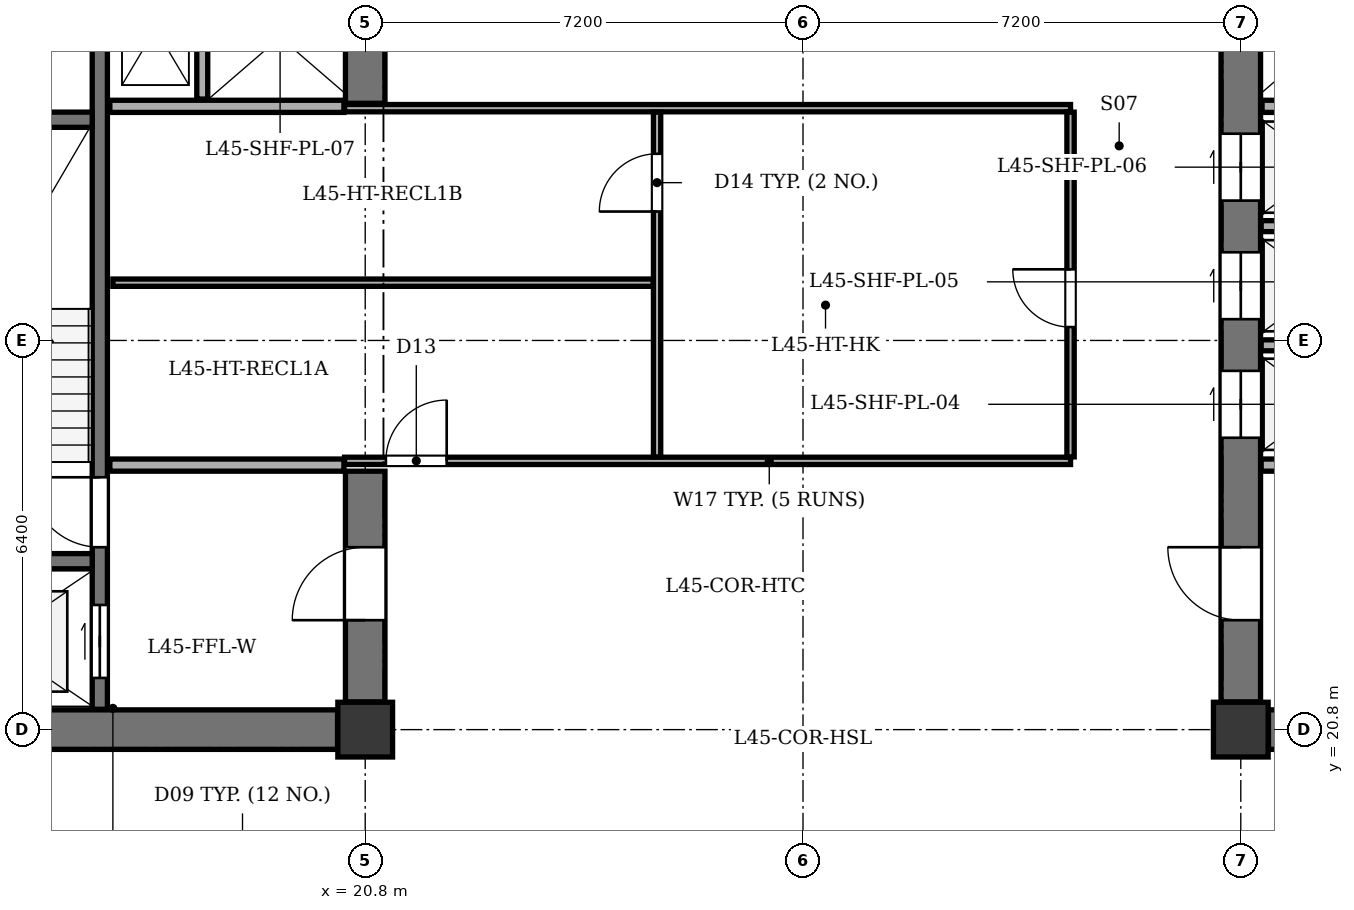
"""IFC4 building model, lengths in metres.
Left out: names, types, materials, properties, quantities, classifications, styles, units other than length and angle.
Written with IfcOpenShell. Run it as: python <this file> out.ifc"""

import sys

from ifc_helpers import new_model, si_unit, direction, frame, frame_2d, origin, origin_2d, place, context, subcontext, project, spatial, rectangle, extrude, element, fill, save


model = new_model("IFC4")
c1 = context("Model", 3, precision=1e-05, world=origin(), true_north=direction((0.0, 1.0)))
c2 = subcontext(c1, "Body", "Model", "MODEL_VIEW")
j1 = project(units=[si_unit("LENGTHUNIT", "METRE"), si_unit("PLANEANGLEUNIT", "RADIAN")], contexts=[c1])
p1 = place(None, origin())
s1 = spatial("IfcSite", under=j1, at=p1, CompositionType="ELEMENT")
p2 = place(p1, origin())
s2 = spatial("IfcBuilding", under=s1, at=p2, CompositionType="ELEMENT")
p3 = place(p2, frame((0.0, 0.0, 176.3)))
s3 = spatial("IfcBuildingStorey", under=s2, at=p3, CompositionType="ELEMENT", Elevation=176.3)
for number, where, z_axis, x_axis in (
    (1, (20.8, 20.8, 0.0), (0.0, 0.0, 1.0), (1.0, 0.0, 0.0)),
    (2, (35.2, 20.8, 0.0), (0.0, 0.0, 1.0), (1.0, 0.0, 0.0)),
):
    element("IfcColumn", number, at=place(p3, frame(where, z_axis=z_axis, x_axis=x_axis)), inside=s3, PredefinedType="COLUMN", context=c2, shape_type="SweptSolid", body=[
        extrude(rectangle(XDim=0.9, YDim=0.9, at=origin_2d()), origin(), (0.0, 0.0, 1.0), 3.5),
    ])
p4 = place(p3, frame((13.255, 20.8, 0.0), z_axis=(0.0, 0.0, 1.0), x_axis=(1.0, 0.0, 0.0)))
e3 = element("IfcWall", 3, at=p4, inside=s3, PredefinedType="SHEAR", context=c2, shape_type="SweptSolid", body=[
    extrude(rectangle(XDim=7.09, YDim=0.65, at=frame_2d((3.545, 0.0))), origin(), (0.0, 0.0, 1.0), 3.2),
])
p5 = place(p3, frame((20.8, 21.255, 0.0), z_axis=(0.0, 0.0, 1.0), x_axis=(0.0, 1.0, 0.0)))
e4 = element("IfcWall", 4, at=p5, inside=s3, PredefinedType="SHEAR", context=c2, shape_type="SweptSolid", body=[
    extrude(rectangle(XDim=3.795, YDim=0.65, at=frame_2d((1.897, 0.0))), origin(), (0.0, 0.0, 1.0), 3.2),
])
p6 = place(p5, frame((1.345, 0.0, 0.0)))
e5 = element("IfcOpeningElement", 5, at=p6, cuts=e4, PredefinedType="OPENING", context=c2, shape_type="SweptSolid", body=[
    extrude(rectangle(XDim=1.2, YDim=2.15, at=frame_2d((0.6, 1.075))), frame((0.0, 0.335, 0.0), z_axis=(0.0, -1.0, 0.0), x_axis=(1.0, 0.0, 0.0)), (0.0, 0.0, 1.0), 0.67),
])
p7 = place(p3, frame((20.8, 31.1, 0.0), z_axis=(0.0, 0.0, 1.0), x_axis=(0.0, 1.0, 0.0)))
e6 = element("IfcWall", 6, at=p7, inside=s3, PredefinedType="SHEAR", context=c2, shape_type="SweptSolid", body=[
    extrude(rectangle(XDim=2.045, YDim=0.65, at=frame_2d((1.022, 0.0))), origin(), (0.0, 0.0, 1.0), 3.2),
])
p8 = place(p3, frame((16.435, 21.135, 0.0), z_axis=(0.0, 0.0, 1.0), x_axis=(0.0, 1.0, 0.0)))
e7 = element("IfcWall", 7, at=p8, inside=s3, PredefinedType="SHEAR", context=c2, shape_type="SweptSolid", body=[
    extrude(rectangle(XDim=12.13, YDim=0.25, at=frame_2d((6.065, 0.0))), origin(), (0.0, 0.0, 1.0), 3.2),
])
p9 = place(p8, frame((0.515, 0.0, 0.0)))
e8 = element("IfcOpeningElement", 8, at=p9, cuts=e7, PredefinedType="OPENING", context=c2, shape_type="SweptSolid", body=[
    extrude(rectangle(XDim=1.2, YDim=2.15, at=frame_2d((0.6, 1.075))), frame((0.0, 0.135, 0.0), z_axis=(0.0, -1.0, 0.0), x_axis=(1.0, 0.0, 0.0)), (0.0, 0.0, 1.0), 0.27),
])
p10 = place(p8, frame((2.665, 0.0, 0.0)))
e9 = element("IfcOpeningElement", 9, at=p10, cuts=e7, PredefinedType="OPENING", context=c2, shape_type="SweptSolid", body=[
    extrude(rectangle(XDim=1.15, YDim=2.15, at=frame_2d((0.575, 1.075))), frame((0.0, 0.135, 0.0), z_axis=(0.0, -1.0, 0.0), x_axis=(1.0, 0.0, 0.0)), (0.0, 0.0, 1.0), 0.27),
])
for number, where, z_axis, x_axis in (
    (10, (13.135, 23.57, 0.0), (0.0, 0.0, 1.0), (1.0, 0.0, 0.0)),
    (11, (13.135, 30.83, 0.0), (0.0, 0.0, 1.0), (1.0, 0.0, 0.0)),
):
    element("IfcWall", number, at=place(p3, frame(where, z_axis=z_axis, x_axis=x_axis)), inside=s3, PredefinedType="SHEAR", context=c2, shape_type="SweptSolid", body=[
        extrude(rectangle(XDim=3.175, YDim=0.25, at=frame_2d((1.587, 0.0))), origin(), (0.0, 0.0, 1.0), 3.2),
    ])
for number, where, z_axis, x_axis in (
    (12, (16.6, 25.15, 0.0), (0.0, 0.0, 1.0), (1.0, 0.0, 0.0)),
    (13, (16.6, 31.05, 0.0), (0.0, 0.0, 1.0), (1.0, 0.0, 0.0)),
):
    element("IfcWall", number, at=place(p3, frame(where, z_axis=z_axis, x_axis=x_axis)), inside=s3, PredefinedType="SOLIDWALL", context=c2, shape_type="SweptSolid", body=[
        extrude(rectangle(XDim=3.85, YDim=0.2, at=frame_2d((1.925, 0.0))), origin(), (0.0, 0.0, 1.0), 3.2),
    ])
p11 = place(p3, frame((18.12, 31.17, 0.0), z_axis=(0.0, 0.0, 1.0), x_axis=(0.0, 1.0, 0.0)))
e14 = element("IfcWall", 14, at=p11, inside=s3, PredefinedType="PARTITIONING", context=c2, shape_type="SweptSolid", body=[
    extrude(rectangle(XDim=2.095, YDim=0.18, at=frame_2d((1.047, 0.0))), origin(), (0.0, 0.0, 1.0), 3.2),
])
p12 = place(p3, frame((35.655, 20.8, 0.0), z_axis=(0.0, 0.0, 1.0), x_axis=(1.0, 0.0, 0.0)))
e15 = element("IfcWall", 15, at=p12, inside=s3, PredefinedType="SHEAR", context=c2, shape_type="SweptSolid", body=[
    extrude(rectangle(XDim=7.09, YDim=0.65, at=frame_2d((3.545, 0.0))), origin(), (0.0, 0.0, 1.0), 3.2),
])
p13 = place(p3, frame((35.2, 21.255, 0.0), z_axis=(0.0, 0.0, 1.0), x_axis=(0.0, 1.0, 0.0)))
e16 = element("IfcWall", 16, at=p13, inside=s3, PredefinedType="SHEAR", context=c2, shape_type="SweptSolid", body=[
    extrude(rectangle(XDim=11.89, YDim=0.65, at=frame_2d((5.945, 0.0))), origin(), (0.0, 0.0, 1.0), 3.2),
])
p14 = place(p13, frame((1.345, 0.0, 0.0)))
e17 = element("IfcOpeningElement", 17, at=p14, cuts=e16, PredefinedType="OPENING", context=c2, shape_type="SweptSolid", body=[
    extrude(rectangle(XDim=1.2, YDim=2.15, at=frame_2d((0.6, 1.075))), frame((0.0, 0.335, 0.0), z_axis=(0.0, -1.0, 0.0), x_axis=(1.0, 0.0, 0.0)), (0.0, 0.0, 1.0), 0.67),
])
p15 = place(p13, frame((4.345, 0.0, 0.0)))
e18 = element("IfcOpeningElement", 18, at=p15, cuts=e16, PredefinedType="OPENING", context=c2, shape_type="SweptSolid", body=[
    extrude(rectangle(XDim=1.1, YDim=2.1, at=frame_2d((0.55, 1.05))), frame((0.0, 0.335, 0.0), z_axis=(0.0, -1.0, 0.0), x_axis=(1.0, 0.0, 0.0)), (0.0, 0.0, 1.0), 0.67),
])
p16 = place(p13, frame((6.295, 0.0, 0.0)))
e19 = element("IfcOpeningElement", 19, at=p16, cuts=e16, PredefinedType="OPENING", context=c2, shape_type="SweptSolid", body=[
    extrude(rectangle(XDim=1.1, YDim=2.1, at=frame_2d((0.55, 1.05))), frame((0.0, 0.335, 0.0), z_axis=(0.0, -1.0, 0.0), x_axis=(1.0, 0.0, 0.0)), (0.0, 0.0, 1.0), 0.67),
])
p17 = place(p13, frame((8.245, 0.0, 0.0)))
e20 = element("IfcOpeningElement", 20, at=p17, cuts=e16, PredefinedType="OPENING", context=c2, shape_type="SweptSolid", body=[
    extrude(rectangle(XDim=1.1, YDim=2.1, at=frame_2d((0.55, 1.05))), frame((0.0, 0.335, 0.0), z_axis=(0.0, -1.0, 0.0), x_axis=(1.0, 0.0, 0.0)), (0.0, 0.0, 1.0), 0.67),
])
p18 = place(p3, frame((35.535, 25.15, 0.0), z_axis=(0.0, 0.0, 1.0), x_axis=(1.0, 0.0, 0.0)))
e21 = element("IfcWall", 21, at=p18, inside=s3, PredefinedType="SOLIDWALL", context=c2, shape_type="SweptSolid", body=[
    extrude(rectangle(XDim=3.865, YDim=0.2, at=frame_2d((1.933, 0.0))), origin(), (0.0, 0.0, 1.0), 3.2),
])
p19 = place(p3, frame((35.55, 31.05, 0.0), z_axis=(0.0, 0.0, 1.0), x_axis=(1.0, 0.0, 0.0)))
e22 = element("IfcWall", 22, at=p19, inside=s3, PredefinedType="SOLIDWALL", context=c2, shape_type="SweptSolid", body=[
    extrude(rectangle(XDim=2.25, YDim=0.2, at=frame_2d((1.125, 0.0))), origin(), (0.0, 0.0, 1.0), 3.2),
])
for number, where, z_axis, x_axis in (
    (23, (35.535, 27.12, 0.0), (0.0, 0.0, 1.0), (1.0, 0.0, 0.0)),
    (24, (35.535, 29.08, 0.0), (0.0, 0.0, 1.0), (1.0, 0.0, 0.0)),
):
    element("IfcWall", number, at=place(p3, frame(where, z_axis=z_axis, x_axis=x_axis)), inside=s3, PredefinedType="PARTITIONING", context=c2, shape_type="SweptSolid", body=[
        extrude(rectangle(XDim=2.245, YDim=0.18, at=frame_2d((1.123, 0.0))), origin(), (0.0, 0.0, 1.0), 3.2),
    ])
p20 = place(p3, frame((20.46, 25.22, 0.0), z_axis=(0.0, 0.0, 1.0), x_axis=(1.0, 0.0, 0.0)))
e25 = element("IfcWall", 25, at=p20, inside=s3, PredefinedType="PARTITIONING", context=c2, shape_type="SweptSolid", body=[
    extrude(rectangle(XDim=11.94, YDim=0.12, at=frame_2d((5.97, 0.0))), origin(), (0.0, 0.0, 1.0), 3.2),
])
p21 = place(p20, frame((0.68, 0.0, 0.0)))
e26 = element("IfcOpeningElement", 26, at=p21, cuts=e25, PredefinedType="OPENING", context=c2, shape_type="SweptSolid", body=[
    extrude(rectangle(XDim=1.0, YDim=2.1, at=frame_2d((0.5, 1.05))), frame((0.0, 0.07, 0.0), z_axis=(0.0, -1.0, 0.0), x_axis=(1.0, 0.0, 0.0)), (0.0, 0.0, 1.0), 0.14),
])
p22 = place(p3, frame((20.46, 31.02, 0.0), z_axis=(0.0, 0.0, 1.0), x_axis=(1.0, 0.0, 0.0)))
e27 = element("IfcWall", 27, at=p22, inside=s3, PredefinedType="PARTITIONING", context=c2, shape_type="SweptSolid", body=[
    extrude(rectangle(XDim=11.94, YDim=0.12, at=frame_2d((5.97, 0.0))), origin(), (0.0, 0.0, 1.0), 3.2),
])
p23 = place(p3, frame((32.4, 25.285, 0.0), z_axis=(0.0, 0.0, 1.0), x_axis=(0.0, 1.0, 0.0)))
e28 = element("IfcWall", 28, at=p23, inside=s3, PredefinedType="PARTITIONING", context=c2, shape_type="SweptSolid", body=[
    extrude(rectangle(XDim=5.67, YDim=0.12, at=frame_2d((2.835, 0.0))), origin(), (0.0, 0.0, 1.0), 3.2),
])
p24 = place(p23, frame((2.135, 0.0, 0.0)))
e29 = element("IfcOpeningElement", 29, at=p24, cuts=e28, PredefinedType="OPENING", context=c2, shape_type="SweptSolid", body=[
    extrude(rectangle(XDim=0.95, YDim=2.1, at=frame_2d((0.475, 1.05))), frame((0.0, 0.07, 0.0), z_axis=(0.0, -1.0, 0.0), x_axis=(1.0, 0.0, 0.0)), (0.0, 0.0, 1.0), 0.14),
])
p25 = place(p3, frame((25.6, 25.285, 0.0), z_axis=(0.0, 0.0, 1.0), x_axis=(0.0, 1.0, 0.0)))
e30 = element("IfcWall", 30, at=p25, inside=s3, PredefinedType="PARTITIONING", context=c2, shape_type="SweptSolid", body=[
    extrude(rectangle(XDim=5.67, YDim=0.12, at=frame_2d((2.835, 0.0))), origin(), (0.0, 0.0, 1.0), 3.2),
])
p26 = place(p25, frame((4.035, 0.0, 0.0)))
e31 = element("IfcOpeningElement", 31, at=p26, cuts=e30, PredefinedType="OPENING", context=c2, shape_type="SweptSolid", body=[
    extrude(rectangle(XDim=0.95, YDim=2.1, at=frame_2d((0.475, 1.05))), frame((0.0, 0.07, 0.0), z_axis=(0.0, -1.0, 0.0), x_axis=(1.0, 0.0, 0.0)), (0.0, 0.0, 1.0), 0.14),
])
p27 = place(p3, frame((16.65, 28.15, 0.0), z_axis=(0.0, 0.0, 1.0), x_axis=(1.0, 0.0, 0.0)))
e32 = element("IfcWall", 32, at=p27, inside=s3, PredefinedType="PARTITIONING", context=c2, shape_type="SweptSolid", body=[
    extrude(rectangle(XDim=8.885, YDim=0.12, at=frame_2d((4.442, 0.0))), origin(), (0.0, 0.0, 1.0), 3.2),
])
p28 = place(p6, origin())
e33 = element("IfcDoor", 33, at=p28, inside=s3, OperationType="SINGLE_SWING_LEFT", PredefinedType="DOOR", context=c2, shape_type="SweptSolid", body=[
    extrude(rectangle(XDim=1.2, YDim=2.15, at=frame_2d((0.6, 1.075))), frame((0.0, 0.025, 0.0), z_axis=(0.0, -1.0, 0.0), x_axis=(1.0, 0.0, 0.0)), (0.0, 0.0, 1.0), 0.05),
])
fill(e5, e33)
p29 = place(p9, origin())
e34 = element("IfcDoor", 34, at=p29, inside=s3, OperationType="DOUBLE_DOOR_SLIDING", PredefinedType="DOOR", context=c2, shape_type="SweptSolid", body=[
    extrude(rectangle(XDim=1.2, YDim=2.15, at=frame_2d((0.6, 1.075))), frame((0.0, 0.025, 0.0), z_axis=(0.0, -1.0, 0.0), x_axis=(1.0, 0.0, 0.0)), (0.0, 0.0, 1.0), 0.05),
])
fill(e8, e34)
p30 = place(p10, origin())
e35 = element("IfcDoor", 35, at=p30, inside=s3, OperationType="SINGLE_SWING_RIGHT", PredefinedType="DOOR", context=c2, shape_type="SweptSolid", body=[
    extrude(rectangle(XDim=1.15, YDim=2.15, at=frame_2d((0.575, 1.075))), frame((0.0, 0.025, 0.0), z_axis=(0.0, -1.0, 0.0), x_axis=(1.0, 0.0, 0.0)), (0.0, 0.0, 1.0), 0.05),
])
fill(e9, e35)
p31 = place(p14, origin())
e36 = element("IfcDoor", 36, at=p31, inside=s3, OperationType="SINGLE_SWING_RIGHT", PredefinedType="DOOR", context=c2, shape_type="SweptSolid", body=[
    extrude(rectangle(XDim=1.2, YDim=2.15, at=frame_2d((0.6, 1.075))), frame((0.0, 0.025, 0.0), z_axis=(0.0, -1.0, 0.0), x_axis=(1.0, 0.0, 0.0)), (0.0, 0.0, 1.0), 0.05),
])
fill(e17, e36)
p32 = place(p15, origin())
e37 = element("IfcDoor", 37, at=p32, inside=s3, OperationType="DOUBLE_DOOR_SLIDING", PredefinedType="DOOR", context=c2, shape_type="SweptSolid", body=[
    extrude(rectangle(XDim=1.1, YDim=2.1, at=frame_2d((0.55, 1.05))), frame((0.0, 0.025, 0.0), z_axis=(0.0, -1.0, 0.0), x_axis=(1.0, 0.0, 0.0)), (0.0, 0.0, 1.0), 0.05),
])
fill(e18, e37)
p33 = place(p16, origin())
e38 = element("IfcDoor", 38, at=p33, inside=s3, OperationType="DOUBLE_DOOR_SLIDING", PredefinedType="DOOR", context=c2, shape_type="SweptSolid", body=[
    extrude(rectangle(XDim=1.1, YDim=2.1, at=frame_2d((0.55, 1.05))), frame((0.0, 0.025, 0.0), z_axis=(0.0, -1.0, 0.0), x_axis=(1.0, 0.0, 0.0)), (0.0, 0.0, 1.0), 0.05),
])
fill(e19, e38)
p34 = place(p17, origin())
e39 = element("IfcDoor", 39, at=p34, inside=s3, OperationType="DOUBLE_DOOR_SLIDING", PredefinedType="DOOR", context=c2, shape_type="SweptSolid", body=[
    extrude(rectangle(XDim=1.1, YDim=2.1, at=frame_2d((0.55, 1.05))), frame((0.0, 0.025, 0.0), z_axis=(0.0, -1.0, 0.0), x_axis=(1.0, 0.0, 0.0)), (0.0, 0.0, 1.0), 0.05),
])
fill(e20, e39)
p35 = place(p21, origin())
e40 = element("IfcDoor", 40, at=p35, inside=s3, OperationType="SINGLE_SWING_RIGHT", PredefinedType="DOOR", context=c2, shape_type="SweptSolid", body=[
    extrude(rectangle(XDim=1.0, YDim=2.1, at=frame_2d((0.5, 1.05))), frame((0.0, 0.025, 0.0), z_axis=(0.0, -1.0, 0.0), x_axis=(1.0, 0.0, 0.0)), (0.0, 0.0, 1.0), 0.05),
])
fill(e26, e40)
p36 = place(p26, origin())
e41 = element("IfcDoor", 41, at=p36, inside=s3, OperationType="SINGLE_SWING_LEFT", PredefinedType="DOOR", context=c2, shape_type="SweptSolid", body=[
    extrude(rectangle(XDim=0.95, YDim=2.1, at=frame_2d((0.475, 1.05))), frame((0.0, 0.025, 0.0), z_axis=(0.0, -1.0, 0.0), x_axis=(1.0, 0.0, 0.0)), (0.0, 0.0, 1.0), 0.05),
])
fill(e31, e41)
p37 = place(p24, origin())
e42 = element("IfcDoor", 42, at=p37, inside=s3, OperationType="SINGLE_SWING_RIGHT", PredefinedType="DOOR", context=c2, shape_type="SweptSolid", body=[
    extrude(rectangle(XDim=0.95, YDim=2.1, at=frame_2d((0.475, 1.05))), frame((0.0, 0.025, 0.0), z_axis=(0.0, -1.0, 0.0), x_axis=(1.0, 0.0, 0.0)), (0.0, 0.0, 1.0), 0.05),
])
fill(e29, e42)
save(model, sys.argv[1])
